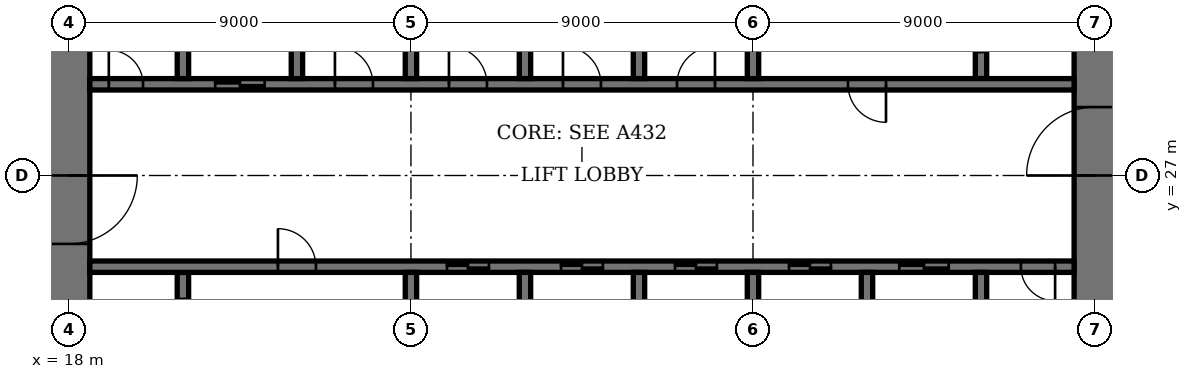
"""IFC4 building model, lengths in metres.
Left out: names, types, materials, properties, quantities, classifications, styles, units other than length and angle.
Written with IfcOpenShell. Run it as: python <this file> out.ifc"""

import sys

from ifc_helpers import new_model, si_unit, direction, frame, frame_2d, origin, place, context, subcontext, project, spatial, rectangle, extrude, element, fill, save


model = new_model("IFC4")
c1 = context("Model", 3, precision=1e-05, world=origin(), true_north=direction((0.0, 1.0)))
c2 = subcontext(c1, "Body", "Model", "MODEL_VIEW")
j1 = project(units=[si_unit("LENGTHUNIT", "METRE"), si_unit("PLANEANGLEUNIT", "RADIAN")], contexts=[c1])
p1 = place(None, origin())
s1 = spatial("IfcSite", under=j1, at=p1, CompositionType="ELEMENT")
p2 = place(p1, origin())
s2 = spatial("IfcBuilding", under=s1, at=p2, CompositionType="ELEMENT")
p3 = place(p2, frame((0.0, 0.0, 251.4)))
s3 = spatial("IfcBuildingStorey", under=s2, at=p3, CompositionType="ELEMENT", Elevation=251.4)
p4 = place(p3, frame((18.0, 35.45, 0.0), z_axis=(0.0, 0.0, 1.0), x_axis=(0.0, -1.0, 0.0)))
e1 = element("IfcWall", 1, at=p4, inside=s3, PredefinedType="SHEAR", context=c2, shape_type="SweptSolid", body=[
    extrude(rectangle(XDim=16.9, YDim=1.1, at=frame_2d((8.45, 0.0))), origin(), (0.0, 0.0, 1.0), 4.0),
])
p5 = place(p4, frame((8.45, 0.0, 0.0)))
e2 = element("IfcOpeningElement", 2, at=p5, cuts=e1, PredefinedType="OPENING", context=c2, shape_type="SweptSolid", body=[
    extrude(rectangle(XDim=1.8, YDim=2.4, at=frame_2d((0.9, 1.2))), frame((0.0, 0.56, 0.0), z_axis=(0.0, -1.0, 0.0), x_axis=(1.0, 0.0, 0.0)), (0.0, 0.0, 1.0), 1.12),
])
p6 = place(p3, frame((45.0, 18.55, 0.0), z_axis=(0.0, 0.0, 1.0), x_axis=(0.0, 1.0, 0.0)))
e3 = element("IfcWall", 3, at=p6, inside=s3, PredefinedType="SHEAR", context=c2, shape_type="SweptSolid", body=[
    extrude(rectangle(XDim=16.9, YDim=1.1, at=frame_2d((8.45, 0.0))), origin(), (0.0, 0.0, 1.0), 4.0),
])
p7 = place(p6, frame((8.45, 0.0, 0.0)))
e4 = element("IfcOpeningElement", 4, at=p7, cuts=e3, PredefinedType="OPENING", context=c2, shape_type="SweptSolid", body=[
    extrude(rectangle(XDim=1.8, YDim=2.4, at=frame_2d((0.9, 1.2))), frame((0.0, 0.56, 0.0), z_axis=(0.0, -1.0, 0.0), x_axis=(1.0, 0.0, 0.0)), (0.0, 0.0, 1.0), 1.12),
])
p8 = place(p3, frame((21.0, 21.95, 0.0), z_axis=(0.0, 0.0, 1.0), x_axis=(0.0, 1.0, 0.0)))
e5 = element("IfcWall", 5, at=p8, inside=s3, PredefinedType="SHEAR", context=c2, shape_type="SweptSolid", body=[
    extrude(rectangle(XDim=2.5, YDim=0.3, at=frame_2d((1.25, 0.0))), origin(), (0.0, 0.0, 1.0), 4.0),
])
p9 = place(p8, frame((0.7, 0.0, 0.0)))
e6 = element("IfcOpeningElement", 6, at=p9, cuts=e5, PredefinedType="OPENING", context=c2, shape_type="SweptSolid", body=[
    extrude(rectangle(XDim=1.1, YDim=2.4, at=frame_2d((0.55, 1.2))), frame((0.0, 0.16, 0.0), z_axis=(0.0, -1.0, 0.0), x_axis=(1.0, 0.0, 0.0)), (0.0, 0.0, 1.0), 0.32),
])
p10 = place(p3, frame((42.0, 29.55, 0.0), z_axis=(0.0, 0.0, 1.0), x_axis=(0.0, 1.0, 0.0)))
e7 = element("IfcWall", 7, at=p10, inside=s3, PredefinedType="SHEAR", context=c2, shape_type="SweptSolid", body=[
    extrude(rectangle(XDim=2.5, YDim=0.3, at=frame_2d((1.25, 0.0))), origin(), (0.0, 0.0, 1.0), 4.0),
])
p11 = place(p10, frame((0.7, 0.0, 0.0)))
e8 = element("IfcOpeningElement", 8, at=p11, cuts=e7, PredefinedType="OPENING", context=c2, shape_type="SweptSolid", body=[
    extrude(rectangle(XDim=1.1, YDim=2.4, at=frame_2d((0.55, 1.2))), frame((0.0, 0.16, 0.0), z_axis=(0.0, -1.0, 0.0), x_axis=(1.0, 0.0, 0.0)), (0.0, 0.0, 1.0), 0.32),
])
p12 = place(p3, frame((18.55, 24.6, 0.0), z_axis=(0.0, 0.0, 1.0), x_axis=(1.0, 0.0, 0.0)))
e9 = element("IfcWall", 9, at=p12, inside=s3, PredefinedType="SHEAR", context=c2, shape_type="SweptSolid", body=[
    extrude(rectangle(XDim=25.9, YDim=0.3, at=frame_2d((12.95, 0.0))), origin(), (0.0, 0.0, 1.0), 4.0),
])
p13 = place(p12, frame((4.95, 0.0, 0.0)))
e10 = element("IfcOpeningElement", 10, at=p13, cuts=e9, PredefinedType="OPENING", context=c2, shape_type="SweptSolid", body=[
    extrude(rectangle(XDim=1.0, YDim=2.4, at=frame_2d((0.5, 1.2))), frame((0.0, 0.16, 0.0), z_axis=(0.0, -1.0, 0.0), x_axis=(1.0, 0.0, 0.0)), (0.0, 0.0, 1.0), 0.32),
])
p14 = place(p12, frame((24.5, 0.0, 0.0)))
e11 = element("IfcOpeningElement", 11, at=p14, cuts=e9, PredefinedType="OPENING", context=c2, shape_type="SweptSolid", body=[
    extrude(rectangle(XDim=0.9, YDim=2.1, at=frame_2d((0.45, 1.05))), frame((0.0, 0.16, 0.0), z_axis=(0.0, -1.0, 0.0), x_axis=(1.0, 0.0, 0.0)), (0.0, 0.0, 1.0), 0.32),
])
p15 = place(p12, frame((9.4, 0.0, 0.0)))
e12 = element("IfcOpeningElement", 12, at=p15, cuts=e9, PredefinedType="OPENING", context=c2, shape_type="SweptSolid", body=[
    extrude(rectangle(XDim=1.1, YDim=2.4, at=frame_2d((0.55, 1.2))), frame((0.0, 0.16, 0.0), z_axis=(0.0, -1.0, 0.0), x_axis=(1.0, 0.0, 0.0)), (0.0, 0.0, 1.0), 0.32),
])
p16 = place(p12, frame((12.4, 0.0, 0.0)))
e13 = element("IfcOpeningElement", 13, at=p16, cuts=e9, PredefinedType="OPENING", context=c2, shape_type="SweptSolid", body=[
    extrude(rectangle(XDim=1.1, YDim=2.4, at=frame_2d((0.55, 1.2))), frame((0.0, 0.16, 0.0), z_axis=(0.0, -1.0, 0.0), x_axis=(1.0, 0.0, 0.0)), (0.0, 0.0, 1.0), 0.32),
])
p17 = place(p12, frame((15.4, 0.0, 0.0)))
e14 = element("IfcOpeningElement", 14, at=p17, cuts=e9, PredefinedType="OPENING", context=c2, shape_type="SweptSolid", body=[
    extrude(rectangle(XDim=1.1, YDim=2.4, at=frame_2d((0.55, 1.2))), frame((0.0, 0.16, 0.0), z_axis=(0.0, -1.0, 0.0), x_axis=(1.0, 0.0, 0.0)), (0.0, 0.0, 1.0), 0.32),
])
p18 = place(p12, frame((18.4, 0.0, 0.0)))
e15 = element("IfcOpeningElement", 15, at=p18, cuts=e9, PredefinedType="OPENING", context=c2, shape_type="SweptSolid", body=[
    extrude(rectangle(XDim=1.1, YDim=2.4, at=frame_2d((0.55, 1.2))), frame((0.0, 0.16, 0.0), z_axis=(0.0, -1.0, 0.0), x_axis=(1.0, 0.0, 0.0)), (0.0, 0.0, 1.0), 0.32),
])
p19 = place(p12, frame((21.3, 0.0, 0.0)))
e16 = element("IfcOpeningElement", 16, at=p19, cuts=e9, PredefinedType="OPENING", context=c2, shape_type="SweptSolid", body=[
    extrude(rectangle(XDim=1.3, YDim=2.4, at=frame_2d((0.65, 1.2))), frame((0.0, 0.16, 0.0), z_axis=(0.0, -1.0, 0.0), x_axis=(1.0, 0.0, 0.0)), (0.0, 0.0, 1.0), 0.32),
])
p20 = place(p3, frame((18.55, 29.4, 0.0), z_axis=(0.0, 0.0, 1.0), x_axis=(1.0, 0.0, 0.0)))
e17 = element("IfcWall", 17, at=p20, inside=s3, PredefinedType="SHEAR", context=c2, shape_type="SweptSolid", body=[
    extrude(rectangle(XDim=25.9, YDim=0.3, at=frame_2d((12.95, 0.0))), origin(), (0.0, 0.0, 1.0), 4.0),
])
p21 = place(p20, frame((19.95, 0.0, 0.0)))
e18 = element("IfcOpeningElement", 18, at=p21, cuts=e17, PredefinedType="OPENING", context=c2, shape_type="SweptSolid", body=[
    extrude(rectangle(XDim=1.0, YDim=2.4, at=frame_2d((0.5, 1.2))), frame((0.0, 0.16, 0.0), z_axis=(0.0, -1.0, 0.0), x_axis=(1.0, 0.0, 0.0)), (0.0, 0.0, 1.0), 0.32),
])
p22 = place(p20, frame((0.5, 0.0, 0.0)))
e19 = element("IfcOpeningElement", 19, at=p22, cuts=e17, PredefinedType="OPENING", context=c2, shape_type="SweptSolid", body=[
    extrude(rectangle(XDim=0.9, YDim=2.1, at=frame_2d((0.45, 1.05))), frame((0.0, 0.16, 0.0), z_axis=(0.0, -1.0, 0.0), x_axis=(1.0, 0.0, 0.0)), (0.0, 0.0, 1.0), 0.32),
])
p23 = place(p20, frame((15.45, 0.0, 0.0)))
e20 = element("IfcOpeningElement", 20, at=p23, cuts=e17, PredefinedType="OPENING", context=c2, shape_type="SweptSolid", body=[
    extrude(rectangle(XDim=1.0, YDim=2.4, at=frame_2d((0.5, 1.2))), frame((0.0, 0.16, 0.0), z_axis=(0.0, -1.0, 0.0), x_axis=(1.0, 0.0, 0.0)), (0.0, 0.0, 1.0), 0.32),
])
p24 = place(p20, frame((12.45, 0.0, 0.0)))
e21 = element("IfcOpeningElement", 21, at=p24, cuts=e17, PredefinedType="OPENING", context=c2, shape_type="SweptSolid", body=[
    extrude(rectangle(XDim=1.0, YDim=2.4, at=frame_2d((0.5, 1.2))), frame((0.0, 0.16, 0.0), z_axis=(0.0, -1.0, 0.0), x_axis=(1.0, 0.0, 0.0)), (0.0, 0.0, 1.0), 0.32),
])
p25 = place(p20, frame((9.45, 0.0, 0.0)))
e22 = element("IfcOpeningElement", 22, at=p25, cuts=e17, PredefinedType="OPENING", context=c2, shape_type="SweptSolid", body=[
    extrude(rectangle(XDim=1.0, YDim=2.4, at=frame_2d((0.5, 1.2))), frame((0.0, 0.16, 0.0), z_axis=(0.0, -1.0, 0.0), x_axis=(1.0, 0.0, 0.0)), (0.0, 0.0, 1.0), 0.32),
])
p26 = place(p20, frame((6.45, 0.0, 0.0)))
e23 = element("IfcOpeningElement", 23, at=p26, cuts=e17, PredefinedType="OPENING", context=c2, shape_type="SweptSolid", body=[
    extrude(rectangle(XDim=1.0, YDim=2.4, at=frame_2d((0.5, 1.2))), frame((0.0, 0.16, 0.0), z_axis=(0.0, -1.0, 0.0), x_axis=(1.0, 0.0, 0.0)), (0.0, 0.0, 1.0), 0.32),
])
p27 = place(p20, frame((3.3, 0.0, 0.0)))
e24 = element("IfcOpeningElement", 24, at=p27, cuts=e17, PredefinedType="OPENING", context=c2, shape_type="SweptSolid", body=[
    extrude(rectangle(XDim=1.3, YDim=2.4, at=frame_2d((0.65, 1.2))), frame((0.0, 0.16, 0.0), z_axis=(0.0, -1.0, 0.0), x_axis=(1.0, 0.0, 0.0)), (0.0, 0.0, 1.0), 0.32),
])
for number, where, z_axis, x_axis in (
    (25, (30.0, 21.75, 0.0), (0.0, 0.0, 1.0), (0.0, 1.0, 0.0)),
    (26, (33.0, 29.55, 0.0), (0.0, 0.0, 1.0), (0.0, 1.0, 0.0)),
    (27, (33.0, 21.75, 0.0), (0.0, 0.0, 1.0), (0.0, 1.0, 0.0)),
    (28, (30.0, 29.55, 0.0), (0.0, 0.0, 1.0), (0.0, 1.0, 0.0)),
    (29, (36.0, 21.75, 0.0), (0.0, 0.0, 1.0), (0.0, 1.0, 0.0)),
    (30, (27.0, 29.55, 0.0), (0.0, 0.0, 1.0), (0.0, 1.0, 0.0)),
):
    element("IfcWall", number, at=place(p3, frame(where, z_axis=z_axis, x_axis=x_axis)), inside=s3, PredefinedType="SHEAR", context=c2, shape_type="SweptSolid", body=[
        extrude(rectangle(XDim=2.7, YDim=0.3, at=frame_2d((1.35, 0.0))), origin(), (0.0, 0.0, 1.0), 4.0),
    ])
for number, where, z_axis, x_axis in (
    (31, (39.0, 18.55, 0.0), (0.0, 0.0, 1.0), (0.0, 1.0, 0.0)),
    (32, (24.0, 29.55, 0.0), (0.0, 0.0, 1.0), (0.0, 1.0, 0.0)),
):
    element("IfcWall", number, at=place(p3, frame(where, z_axis=z_axis, x_axis=x_axis)), inside=s3, PredefinedType="SHEAR", context=c2, shape_type="SweptSolid", body=[
        extrude(rectangle(XDim=5.9, YDim=0.3, at=frame_2d((2.95, 0.0))), origin(), (0.0, 0.0, 1.0), 4.0),
    ])
for number, where, z_axis, x_axis in (
    (33, (42.0, 21.75, 0.0), (0.0, 0.0, 1.0), (0.0, 1.0, 0.0)),
    (34, (21.0, 29.55, 0.0), (0.0, 0.0, 1.0), (0.0, 1.0, 0.0)),
):
    element("IfcWall", number, at=place(p3, frame(where, z_axis=z_axis, x_axis=x_axis)), inside=s3, PredefinedType="SHEAR", context=c2, shape_type="SweptSolid", body=[
        extrude(rectangle(XDim=2.7, YDim=0.3, at=frame_2d((1.35, 0.0))), origin(), (0.0, 0.0, 1.0), 4.0),
    ])
for number, where, z_axis, x_axis in (
    (35, (27.0, 21.6, 0.0), (0.0, 0.0, 1.0), (0.0, 1.0, 0.0)),
    (36, (36.0, 29.55, 0.0), (0.0, 0.0, 1.0), (0.0, 1.0, 0.0)),
):
    element("IfcWall", number, at=place(p3, frame(where, z_axis=z_axis, x_axis=x_axis)), inside=s3, PredefinedType="SHEAR", context=c2, shape_type="SweptSolid", body=[
        extrude(rectangle(XDim=2.85, YDim=0.3, at=frame_2d((1.425, 0.0))), origin(), (0.0, 0.0, 1.0), 4.0),
    ])
p28 = place(p5, origin())
e37 = element("IfcDoor", 37, at=p28, inside=s3, OperationType="DOUBLE_DOOR_DOUBLE_SWING", PredefinedType="DOOR", context=c2, shape_type="SweptSolid", body=[
    extrude(rectangle(XDim=1.8, YDim=2.4, at=frame_2d((0.9, 1.2))), frame((0.0, 0.03, 0.0), z_axis=(0.0, -1.0, 0.0), x_axis=(1.0, 0.0, 0.0)), (0.0, 0.0, 1.0), 0.06),
    extrude(rectangle(XDim=0.04, YDim=2.4, at=frame_2d((0.02, 1.2))), frame((0.0, 0.55, 0.0), z_axis=(0.0, -1.0, 0.0), x_axis=(1.0, 0.0, 0.0)), (0.0, 0.0, 1.0), 1.1),
    extrude(rectangle(XDim=0.04, YDim=2.4, at=frame_2d((1.78, 1.2))), frame((0.0, 0.55, 0.0), z_axis=(0.0, -1.0, 0.0), x_axis=(1.0, 0.0, 0.0)), (0.0, 0.0, 1.0), 1.1),
    extrude(rectangle(XDim=1.8, YDim=0.04, at=frame_2d((0.9, 2.38))), frame((0.0, 0.55, 0.0), z_axis=(0.0, -1.0, 0.0), x_axis=(1.0, 0.0, 0.0)), (0.0, 0.0, 1.0), 1.1),
])
fill(e2, e37)
p29 = place(p7, origin())
e38 = element("IfcDoor", 38, at=p29, inside=s3, OperationType="DOUBLE_DOOR_DOUBLE_SWING", PredefinedType="DOOR", context=c2, shape_type="SweptSolid", body=[
    extrude(rectangle(XDim=1.8, YDim=2.4, at=frame_2d((0.9, 1.2))), frame((0.0, 0.03, 0.0), z_axis=(0.0, -1.0, 0.0), x_axis=(1.0, 0.0, 0.0)), (0.0, 0.0, 1.0), 0.06),
    extrude(rectangle(XDim=0.04, YDim=2.4, at=frame_2d((0.02, 1.2))), frame((0.0, 0.55, 0.0), z_axis=(0.0, -1.0, 0.0), x_axis=(1.0, 0.0, 0.0)), (0.0, 0.0, 1.0), 1.1),
    extrude(rectangle(XDim=0.04, YDim=2.4, at=frame_2d((1.78, 1.2))), frame((0.0, 0.55, 0.0), z_axis=(0.0, -1.0, 0.0), x_axis=(1.0, 0.0, 0.0)), (0.0, 0.0, 1.0), 1.1),
    extrude(rectangle(XDim=1.8, YDim=0.04, at=frame_2d((0.9, 2.38))), frame((0.0, 0.55, 0.0), z_axis=(0.0, -1.0, 0.0), x_axis=(1.0, 0.0, 0.0)), (0.0, 0.0, 1.0), 1.1),
])
fill(e4, e38)
p30 = place(p13, origin())
e39 = element("IfcDoor", 39, at=p30, inside=s3, OperationType="SINGLE_SWING_RIGHT", PredefinedType="DOOR", context=c2, shape_type="SweptSolid", body=[
    extrude(rectangle(XDim=1.0, YDim=2.4, at=frame_2d((0.5, 1.2))), frame((0.0, 0.03, 0.0), z_axis=(0.0, -1.0, 0.0), x_axis=(1.0, 0.0, 0.0)), (0.0, 0.0, 1.0), 0.06),
])
fill(e10, e39)
p31 = place(p21, origin())
e40 = element("IfcDoor", 40, at=p31, inside=s3, OperationType="SINGLE_SWING_RIGHT", PredefinedType="DOOR", context=c2, shape_type="SweptSolid", body=[
    extrude(rectangle(XDim=1.0, YDim=2.4, at=frame_2d((0.5, 1.2))), frame((0.0, 0.03, 0.0), z_axis=(0.0, -1.0, 0.0), x_axis=(1.0, 0.0, 0.0)), (0.0, 0.0, 1.0), 0.06),
])
fill(e18, e40)
p32 = place(p14, origin())
e41 = element("IfcDoor", 41, at=p32, inside=s3, OperationType="SINGLE_SWING_RIGHT", PredefinedType="DOOR", context=c2, shape_type="SweptSolid", body=[
    extrude(rectangle(XDim=0.9, YDim=2.1, at=frame_2d((0.45, 1.05))), frame((0.0, 0.03, 0.0), z_axis=(0.0, -1.0, 0.0), x_axis=(1.0, 0.0, 0.0)), (0.0, 0.0, 1.0), 0.06),
])
fill(e11, e41)
p33 = place(p22, origin())
e42 = element("IfcDoor", 42, at=p33, inside=s3, OperationType="SINGLE_SWING_RIGHT", PredefinedType="DOOR", context=c2, shape_type="SweptSolid", body=[
    extrude(rectangle(XDim=0.9, YDim=2.1, at=frame_2d((0.45, 1.05))), frame((0.0, 0.03, 0.0), z_axis=(0.0, -1.0, 0.0), x_axis=(1.0, 0.0, 0.0)), (0.0, 0.0, 1.0), 0.06),
])
fill(e19, e42)
p34 = place(p15, origin())
e43 = element("IfcDoor", 43, at=p34, inside=s3, OperationType="DOUBLE_DOOR_SLIDING", PredefinedType="DOOR", context=c2, shape_type="SweptSolid", body=[
    extrude(rectangle(XDim=1.1, YDim=2.4, at=frame_2d((0.55, 1.2))), frame((0.0, 0.02, 0.0), z_axis=(0.0, -1.0, 0.0), x_axis=(1.0, 0.0, 0.0)), (0.0, 0.0, 1.0), 0.04),
])
fill(e12, e43)
p35 = place(p16, origin())
e44 = element("IfcDoor", 44, at=p35, inside=s3, OperationType="DOUBLE_DOOR_SLIDING", PredefinedType="DOOR", context=c2, shape_type="SweptSolid", body=[
    extrude(rectangle(XDim=1.1, YDim=2.4, at=frame_2d((0.55, 1.2))), frame((0.0, 0.02, 0.0), z_axis=(0.0, -1.0, 0.0), x_axis=(1.0, 0.0, 0.0)), (0.0, 0.0, 1.0), 0.04),
])
fill(e13, e44)
p36 = place(p17, origin())
e45 = element("IfcDoor", 45, at=p36, inside=s3, OperationType="DOUBLE_DOOR_SLIDING", PredefinedType="DOOR", context=c2, shape_type="SweptSolid", body=[
    extrude(rectangle(XDim=1.1, YDim=2.4, at=frame_2d((0.55, 1.2))), frame((0.0, 0.02, 0.0), z_axis=(0.0, -1.0, 0.0), x_axis=(1.0, 0.0, 0.0)), (0.0, 0.0, 1.0), 0.04),
])
fill(e14, e45)
p37 = place(p18, origin())
e46 = element("IfcDoor", 46, at=p37, inside=s3, OperationType="DOUBLE_DOOR_SLIDING", PredefinedType="DOOR", context=c2, shape_type="SweptSolid", body=[
    extrude(rectangle(XDim=1.1, YDim=2.4, at=frame_2d((0.55, 1.2))), frame((0.0, 0.02, 0.0), z_axis=(0.0, -1.0, 0.0), x_axis=(1.0, 0.0, 0.0)), (0.0, 0.0, 1.0), 0.04),
])
fill(e15, e46)
p38 = place(p23, origin())
e47 = element("IfcDoor", 47, at=p38, inside=s3, OperationType="SINGLE_SWING_LEFT", PredefinedType="DOOR", context=c2, shape_type="SweptSolid", body=[
    extrude(rectangle(XDim=1.0, YDim=2.4, at=frame_2d((0.5, 1.2))), frame((0.0, 0.03, 0.0), z_axis=(0.0, -1.0, 0.0), x_axis=(1.0, 0.0, 0.0)), (0.0, 0.0, 1.0), 0.06),
])
fill(e20, e47)
p39 = place(p24, origin())
e48 = element("IfcDoor", 48, at=p39, inside=s3, OperationType="SINGLE_SWING_RIGHT", PredefinedType="DOOR", context=c2, shape_type="SweptSolid", body=[
    extrude(rectangle(XDim=1.0, YDim=2.4, at=frame_2d((0.5, 1.2))), frame((0.0, 0.03, 0.0), z_axis=(0.0, -1.0, 0.0), x_axis=(1.0, 0.0, 0.0)), (0.0, 0.0, 1.0), 0.06),
])
fill(e21, e48)
p40 = place(p25, origin())
e49 = element("IfcDoor", 49, at=p40, inside=s3, OperationType="SINGLE_SWING_RIGHT", PredefinedType="DOOR", context=c2, shape_type="SweptSolid", body=[
    extrude(rectangle(XDim=1.0, YDim=2.4, at=frame_2d((0.5, 1.2))), frame((0.0, 0.03, 0.0), z_axis=(0.0, -1.0, 0.0), x_axis=(1.0, 0.0, 0.0)), (0.0, 0.0, 1.0), 0.06),
])
fill(e22, e49)
p41 = place(p26, origin())
e50 = element("IfcDoor", 50, at=p41, inside=s3, OperationType="SINGLE_SWING_RIGHT", PredefinedType="DOOR", context=c2, shape_type="SweptSolid", body=[
    extrude(rectangle(XDim=1.0, YDim=2.4, at=frame_2d((0.5, 1.2))), frame((0.0, 0.03, 0.0), z_axis=(0.0, -1.0, 0.0), x_axis=(1.0, 0.0, 0.0)), (0.0, 0.0, 1.0), 0.06),
])
fill(e23, e50)
p42 = place(p19, origin())
e51 = element("IfcDoor", 51, at=p42, inside=s3, OperationType="DOUBLE_DOOR_SLIDING", PredefinedType="DOOR", context=c2, shape_type="SweptSolid", body=[
    extrude(rectangle(XDim=1.3, YDim=2.4, at=frame_2d((0.65, 1.2))), frame((0.0, 0.02, 0.0), z_axis=(0.0, -1.0, 0.0), x_axis=(1.0, 0.0, 0.0)), (0.0, 0.0, 1.0), 0.04),
])
fill(e16, e51)
p43 = place(p27, origin())
e52 = element("IfcDoor", 52, at=p43, inside=s3, OperationType="DOUBLE_DOOR_SLIDING", PredefinedType="DOOR", context=c2, shape_type="SweptSolid", body=[
    extrude(rectangle(XDim=1.3, YDim=2.4, at=frame_2d((0.65, 1.2))), frame((0.0, 0.02, 0.0), z_axis=(0.0, -1.0, 0.0), x_axis=(1.0, 0.0, 0.0)), (0.0, 0.0, 1.0), 0.04),
])
fill(e24, e52)
save(model, sys.argv[1])
